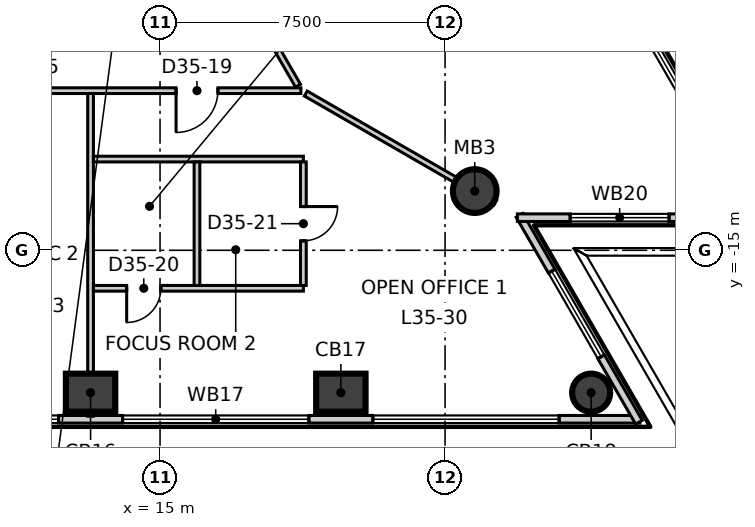
"""IFC4 building model, lengths in metres.
Left out: names, types, materials, properties, quantities, classifications, styles, units other than length and angle.
Written with IfcOpenShell. Run it as: python <this file> out.ifc"""

import sys

from ifc_helpers import new_model, si_unit, direction, frame, frame_2d, origin, origin_2d, place, context, subcontext, project, spatial, rectangle, circle, extrude, element, fill, save


model = new_model("IFC4")
c1 = context("Model", 3, precision=1e-05, world=origin(), true_north=direction((0.0, 1.0)))
c2 = subcontext(c1, "Body", "Model", "MODEL_VIEW")
j1 = project(units=[si_unit("LENGTHUNIT", "METRE"), si_unit("PLANEANGLEUNIT", "RADIAN")], contexts=[c1])
p1 = place(None, origin())
s1 = spatial("IfcSite", under=j1, at=p1, CompositionType="ELEMENT")
p2 = place(p1, origin())
s2 = spatial("IfcBuilding", under=s1, at=p2, CompositionType="ELEMENT")
p3 = place(p2, frame((0.0, 0.0, 152.3)))
s3 = spatial("IfcBuildingStorey", under=s2, at=p3, CompositionType="ELEMENT", Elevation=152.3)
for number, where, z_axis, x_axis in (
    (1, (13.172, -18.746, -0.3), (0.0, 0.0, 1.0), (1.0, 0.0, 0.0)),
    (2, (19.758, -18.746, -0.3), (0.0, 0.0, 1.0), (1.0, 0.0, 0.0)),
):
    element("IfcColumn", number, at=place(p3, frame(where, z_axis=z_axis, x_axis=x_axis)), inside=s3, PredefinedType="COLUMN", context=c2, shape_type="SweptSolid", body=[
        extrude(rectangle(XDim=1.3, YDim=1.0, at=origin_2d()), origin(), (0.0, 0.0, 1.0), 4.0),
    ])
p4 = place(p3, frame((26.344, -18.746, -0.3), z_axis=(0.0, 0.0, 1.0), x_axis=(1.0, 0.0, 0.0)))
e3 = element("IfcColumn", 3, at=p4, inside=s3, PredefinedType="COLUMN", context=c2, shape_type="SweptSolid", body=[
    extrude(circle(Radius=0.5, at=origin_2d()), origin(), (0.0, 0.0, 1.0), 4.0),
])
p5 = place(p3, frame((23.281, -13.442, -0.3), z_axis=(0.0, 0.0, 1.0), x_axis=(1.0, 0.0, 0.0)))
e4 = element("IfcColumn", 4, at=p5, inside=s3, PredefinedType="COLUMN", context=c2, shape_type="SweptSolid", body=[
    extrude(circle(Radius=0.575, at=origin_2d()), origin(), (0.0, 0.0, 1.0), 4.0),
])
p6 = place(p3, frame((-27.647, -19.446, 0.0), z_axis=(0.0, 0.0, 1.0), x_axis=(1.0, 0.0, 0.0)))
e5 = element("IfcWall", 5, at=p6, inside=s3, PredefinedType="ELEMENTEDWALL", context=c2, shape_type="SweptSolid", body=[
    extrude(rectangle(XDim=55.274, YDim=0.2, at=frame_2d((27.637, 0.0))), origin(), (0.0, 0.0, 1.0), 3.7),
])
p7 = place(p6, frame((2.146, 0.0, 0.9)))
e6 = element("IfcOpeningElement", 6, at=p7, cuts=e5, PredefinedType="OPENING", context=c2, shape_type="SweptSolid", body=[
    extrude(rectangle(XDim=4.9, YDim=2.5, at=frame_2d((2.45, 1.25))), frame((0.0, 0.11, 0.0), z_axis=(0.0, -1.0, 0.0), x_axis=(1.0, 0.0, 0.0)), (0.0, 0.0, 1.0), 0.22),
])
p8 = place(p6, frame((8.732, 0.0, 0.9)))
e7 = element("IfcOpeningElement", 7, at=p8, cuts=e5, PredefinedType="OPENING", context=c2, shape_type="SweptSolid", body=[
    extrude(rectangle(XDim=4.9, YDim=2.5, at=frame_2d((2.45, 1.25))), frame((0.0, 0.11, 0.0), z_axis=(0.0, -1.0, 0.0), x_axis=(1.0, 0.0, 0.0)), (0.0, 0.0, 1.0), 0.22),
])
p9 = place(p6, frame((15.318, 0.0, 0.9)))
e8 = element("IfcOpeningElement", 8, at=p9, cuts=e5, PredefinedType="OPENING", context=c2, shape_type="SweptSolid", body=[
    extrude(rectangle(XDim=4.9, YDim=2.5, at=frame_2d((2.45, 1.25))), frame((0.0, 0.11, 0.0), z_axis=(0.0, -1.0, 0.0), x_axis=(1.0, 0.0, 0.0)), (0.0, 0.0, 1.0), 0.22),
])
p10 = place(p6, frame((21.904, 0.0, 0.9)))
e9 = element("IfcOpeningElement", 9, at=p10, cuts=e5, PredefinedType="OPENING", context=c2, shape_type="SweptSolid", body=[
    extrude(rectangle(XDim=4.9, YDim=2.5, at=frame_2d((2.45, 1.25))), frame((0.0, 0.11, 0.0), z_axis=(0.0, -1.0, 0.0), x_axis=(1.0, 0.0, 0.0)), (0.0, 0.0, 1.0), 0.22),
])
p11 = place(p6, frame((28.49, 0.0, 0.9)))
e10 = element("IfcOpeningElement", 10, at=p11, cuts=e5, PredefinedType="OPENING", context=c2, shape_type="SweptSolid", body=[
    extrude(rectangle(XDim=4.9, YDim=2.5, at=frame_2d((2.45, 1.25))), frame((0.0, 0.11, 0.0), z_axis=(0.0, -1.0, 0.0), x_axis=(1.0, 0.0, 0.0)), (0.0, 0.0, 1.0), 0.22),
])
p12 = place(p6, frame((35.076, 0.0, 0.9)))
e11 = element("IfcOpeningElement", 11, at=p12, cuts=e5, PredefinedType="OPENING", context=c2, shape_type="SweptSolid", body=[
    extrude(rectangle(XDim=4.9, YDim=2.5, at=frame_2d((2.45, 1.25))), frame((0.0, 0.11, 0.0), z_axis=(0.0, -1.0, 0.0), x_axis=(1.0, 0.0, 0.0)), (0.0, 0.0, 1.0), 0.22),
])
p13 = place(p6, frame((41.662, 0.0, 0.9)))
e12 = element("IfcOpeningElement", 12, at=p13, cuts=e5, PredefinedType="OPENING", context=c2, shape_type="SweptSolid", body=[
    extrude(rectangle(XDim=4.9, YDim=2.5, at=frame_2d((2.45, 1.25))), frame((0.0, 0.11, 0.0), z_axis=(0.0, -1.0, 0.0), x_axis=(1.0, 0.0, 0.0)), (0.0, 0.0, 1.0), 0.22),
])
p14 = place(p6, frame((48.248, 0.0, 0.9)))
e13 = element("IfcOpeningElement", 13, at=p14, cuts=e5, PredefinedType="OPENING", context=c2, shape_type="SweptSolid", body=[
    extrude(rectangle(XDim=4.9, YDim=2.5, at=frame_2d((2.45, 1.25))), frame((0.0, 0.11, 0.0), z_axis=(0.0, -1.0, 0.0), x_axis=(1.0, 0.0, 0.0)), (0.0, 0.0, 1.0), 0.22),
])
p15 = place(p3, frame((27.602, -19.524, 0.0), z_axis=(0.0, 0.0, 1.0), x_axis=(-0.500074377092, 0.865982457891, 0.0)))
e14 = element("IfcWall", 14, at=p15, inside=s3, PredefinedType="ELEMENTEDWALL", context=c2, shape_type="SweptSolid", body=[
    extrude(rectangle(XDim=6.285, YDim=0.2, at=frame_2d((3.143, 0.0))), origin(), (0.0, 0.0, 1.0), 3.7),
])
p16 = place(p15, frame((1.99, 0.0, 0.9)))
e15 = element("IfcOpeningElement", 15, at=p16, cuts=e14, PredefinedType="OPENING", context=c2, shape_type="SweptSolid", body=[
    extrude(rectangle(XDim=2.6, YDim=2.5, at=frame_2d((1.3, 1.25))), frame((0.0, 0.11, 0.0), z_axis=(0.0, -1.0, 0.0), x_axis=(1.0, 0.0, 0.0)), (0.0, 0.0, 1.0), 0.22),
])
p17 = place(p3, frame((24.404, -14.142, 0.0), z_axis=(0.0, 0.0, 1.0), x_axis=(1.0, 0.0, 0.0)))
e16 = element("IfcWall", 16, at=p17, inside=s3, PredefinedType="ELEMENTEDWALL", context=c2, shape_type="SweptSolid", body=[
    extrude(rectangle(XDim=6.285, YDim=0.2, at=frame_2d((3.143, 0.0))), origin(), (0.0, 0.0, 1.0), 3.7),
])
p18 = place(p17, frame((1.39, 0.0, 0.9)))
e17 = element("IfcOpeningElement", 17, at=p18, cuts=e16, PredefinedType="OPENING", context=c2, shape_type="SweptSolid", body=[
    extrude(rectangle(XDim=2.6, YDim=2.5, at=frame_2d((1.3, 1.25))), frame((0.0, 0.11, 0.0), z_axis=(0.0, -1.0, 0.0), x_axis=(1.0, 0.0, 0.0)), (0.0, 0.0, 1.0), 0.22),
])
p19 = place(p3, frame((30.664, -14.22, 0.0), z_axis=(0.0, 0.0, 1.0), x_axis=(-0.499984613623, 0.866034286931, 0.0)))
e18 = element("IfcWall", 18, at=p19, inside=s3, PredefinedType="ELEMENTEDWALL", context=c2, shape_type="SweptSolid", body=[
    extrude(rectangle(XDim=55.274, YDim=0.2, at=frame_2d((27.637, 0.0))), origin(), (0.0, 0.0, 1.0), 3.7),
])
p20 = place(p19, frame((2.146, 0.0, 0.9)))
e19 = element("IfcOpeningElement", 19, at=p20, cuts=e18, PredefinedType="OPENING", context=c2, shape_type="SweptSolid", body=[
    extrude(rectangle(XDim=4.9, YDim=2.5, at=frame_2d((2.45, 1.25))), frame((0.0, 0.11, 0.0), z_axis=(0.0, -1.0, 0.0), x_axis=(1.0, 0.0, 0.0)), (0.0, 0.0, 1.0), 0.22),
])
p21 = place(p19, frame((8.732, 0.0, 0.9)))
e20 = element("IfcOpeningElement", 20, at=p21, cuts=e18, PredefinedType="OPENING", context=c2, shape_type="SweptSolid", body=[
    extrude(rectangle(XDim=4.9, YDim=2.5, at=frame_2d((2.45, 1.25))), frame((0.0, 0.11, 0.0), z_axis=(0.0, -1.0, 0.0), x_axis=(1.0, 0.0, 0.0)), (0.0, 0.0, 1.0), 0.22),
])
p22 = place(p19, frame((15.318, 0.0, 0.9)))
e21 = element("IfcOpeningElement", 21, at=p22, cuts=e18, PredefinedType="OPENING", context=c2, shape_type="SweptSolid", body=[
    extrude(rectangle(XDim=4.9, YDim=2.5, at=frame_2d((2.45, 1.25))), frame((0.0, 0.11, 0.0), z_axis=(0.0, -1.0, 0.0), x_axis=(1.0, 0.0, 0.0)), (0.0, 0.0, 1.0), 0.22),
])
p23 = place(p19, frame((21.904, 0.0, 0.9)))
e22 = element("IfcOpeningElement", 22, at=p23, cuts=e18, PredefinedType="OPENING", context=c2, shape_type="SweptSolid", body=[
    extrude(rectangle(XDim=4.9, YDim=2.5, at=frame_2d((2.45, 1.25))), frame((0.0, 0.11, 0.0), z_axis=(0.0, -1.0, 0.0), x_axis=(1.0, 0.0, 0.0)), (0.0, 0.0, 1.0), 0.22),
])
p24 = place(p19, frame((28.49, 0.0, 0.9)))
e23 = element("IfcOpeningElement", 23, at=p24, cuts=e18, PredefinedType="OPENING", context=c2, shape_type="SweptSolid", body=[
    extrude(rectangle(XDim=4.9, YDim=2.5, at=frame_2d((2.45, 1.25))), frame((0.0, 0.11, 0.0), z_axis=(0.0, -1.0, 0.0), x_axis=(1.0, 0.0, 0.0)), (0.0, 0.0, 1.0), 0.22),
])
p25 = place(p19, frame((35.076, 0.0, 0.9)))
e24 = element("IfcOpeningElement", 24, at=p25, cuts=e18, PredefinedType="OPENING", context=c2, shape_type="SweptSolid", body=[
    extrude(rectangle(XDim=4.9, YDim=2.5, at=frame_2d((2.45, 1.25))), frame((0.0, 0.11, 0.0), z_axis=(0.0, -1.0, 0.0), x_axis=(1.0, 0.0, 0.0)), (0.0, 0.0, 1.0), 0.22),
])
p26 = place(p19, frame((41.662, 0.0, 0.9)))
e25 = element("IfcOpeningElement", 25, at=p26, cuts=e18, PredefinedType="OPENING", context=c2, shape_type="SweptSolid", body=[
    extrude(rectangle(XDim=4.9, YDim=2.5, at=frame_2d((2.45, 1.25))), frame((0.0, 0.11, 0.0), z_axis=(0.0, -1.0, 0.0), x_axis=(1.0, 0.0, 0.0)), (0.0, 0.0, 1.0), 0.22),
])
p27 = place(p19, frame((48.248, 0.0, 0.9)))
e26 = element("IfcOpeningElement", 26, at=p27, cuts=e18, PredefinedType="OPENING", context=c2, shape_type="SweptSolid", body=[
    extrude(rectangle(XDim=4.9, YDim=2.5, at=frame_2d((2.45, 1.25))), frame((0.0, 0.11, 0.0), z_axis=(0.0, -1.0, 0.0), x_axis=(1.0, 0.0, 0.0)), (0.0, 0.0, 1.0), 0.22),
])
p28 = place(p3, frame((0.901, -10.8, 0.0), z_axis=(0.0, 0.0, 1.0), x_axis=(1.0, 0.0, 0.0)))
e27 = element("IfcWall", 27, at=p28, inside=s3, PredefinedType="PARTITIONING", context=c2, shape_type="SweptSolid", body=[
    extrude(rectangle(XDim=17.805, YDim=0.15, at=frame_2d((8.903, 0.0))), origin(), (0.0, 0.0, 1.0), 3.7),
])
p29 = place(p28, frame((9.949, 0.0, 0.0)))
e28 = element("IfcOpeningElement", 28, at=p29, cuts=e27, PredefinedType="OPENING", context=c2, shape_type="SweptSolid", body=[
    extrude(rectangle(XDim=1.1, YDim=2.1, at=frame_2d((0.55, 1.05))), frame((0.0, 0.085, 0.0), z_axis=(0.0, -1.0, 0.0), x_axis=(1.0, 0.0, 0.0)), (0.0, 0.0, 1.0), 0.17),
])
p30 = place(p28, frame((4.349, 0.0, 0.0)))
e29 = element("IfcOpeningElement", 29, at=p30, cuts=e27, PredefinedType="OPENING", context=c2, shape_type="SweptSolid", body=[
    extrude(rectangle(XDim=0.9, YDim=2.1, at=frame_2d((0.45, 1.05))), frame((0.0, 0.085, 0.0), z_axis=(0.0, -1.0, 0.0), x_axis=(1.0, 0.0, 0.0)), (0.0, 0.0, 1.0), 0.17),
])
p31 = place(p28, frame((7.049, 0.0, 0.0)))
e30 = element("IfcOpeningElement", 30, at=p31, cuts=e27, PredefinedType="OPENING", context=c2, shape_type="SweptSolid", body=[
    extrude(rectangle(XDim=1.0, YDim=2.1, at=frame_2d((0.5, 1.05))), frame((0.0, 0.085, 0.0), z_axis=(0.0, -1.0, 0.0), x_axis=(1.0, 0.0, 0.0)), (0.0, 0.0, 1.0), 0.17),
])
p32 = place(p28, frame((14.521, 0.0, 0.0)))
e31 = element("IfcOpeningElement", 31, at=p32, cuts=e27, PredefinedType="OPENING", context=c2, shape_type="SweptSolid", body=[
    extrude(rectangle(XDim=1.1, YDim=2.1, at=frame_2d((0.55, 1.05))), frame((0.0, 0.085, 0.0), z_axis=(0.0, -1.0, 0.0), x_axis=(1.0, 0.0, 0.0)), (0.0, 0.0, 1.0), 0.17),
])
p33 = place(p3, frame((18.836, -10.875, 0.0), z_axis=(0.0, 0.0, 1.0), x_axis=(0.86606191518, -0.499936755075, 0.0)))
e32 = element("IfcWall", 32, at=p33, inside=s3, PredefinedType="PARTITIONING", context=c2, shape_type="SweptSolid", body=[
    extrude(rectangle(XDim=5.753, YDim=0.15, at=frame_2d((2.876, 0.0))), origin(), (0.0, 0.0, 1.0), 3.2),
])
p34 = place(p3, frame((9.803, 4.62, 0.0), z_axis=(0.0, 0.0, 1.0), x_axis=(0.500017706633, -0.866015180614, 0.0)))
e33 = element("IfcWall", 33, at=p34, inside=s3, PredefinedType="PARTITIONING", context=c2, shape_type="SweptSolid", body=[
    extrude(rectangle(XDim=17.656, YDim=0.15, at=frame_2d((8.828, 0.0))), origin(), (0.0, 0.0, 1.0), 3.7),
])
p35 = place(p34, frame((14.456, 0.0, 0.0)))
e34 = element("IfcOpeningElement", 34, at=p35, cuts=e33, PredefinedType="OPENING", context=c2, shape_type="SweptSolid", body=[
    extrude(rectangle(XDim=1.1, YDim=2.1, at=frame_2d((0.55, 1.05))), frame((0.0, 0.085, 0.0), z_axis=(0.0, -1.0, 0.0), x_axis=(1.0, 0.0, 0.0)), (0.0, 0.0, 1.0), 0.17),
])
p36 = place(p34, frame((4.321, 0.0, 0.0)))
e35 = element("IfcOpeningElement", 35, at=p36, cuts=e33, PredefinedType="OPENING", context=c2, shape_type="SweptSolid", body=[
    extrude(rectangle(XDim=1.1, YDim=2.1, at=frame_2d((0.55, 1.05))), frame((0.0, 0.085, 0.0), z_axis=(0.0, -1.0, 0.0), x_axis=(1.0, 0.0, 0.0)), (0.0, 0.0, 1.0), 0.17),
])
p37 = place(p34, frame((10.521, 0.0, 0.0)))
e36 = element("IfcOpeningElement", 36, at=p37, cuts=e33, PredefinedType="OPENING", context=c2, shape_type="SweptSolid", body=[
    extrude(rectangle(XDim=0.9, YDim=2.1, at=frame_2d((0.45, 1.05))), frame((0.0, 0.085, 0.0), z_axis=(0.0, -1.0, 0.0), x_axis=(1.0, 0.0, 0.0)), (0.0, 0.0, 1.0), 0.17),
])
p38 = place(p34, frame((8.121, 0.0, 0.0)))
e37 = element("IfcOpeningElement", 37, at=p38, cuts=e33, PredefinedType="OPENING", context=c2, shape_type="SweptSolid", body=[
    extrude(rectangle(XDim=0.9, YDim=2.1, at=frame_2d((0.45, 1.05))), frame((0.0, 0.085, 0.0), z_axis=(0.0, -1.0, 0.0), x_axis=(1.0, 0.0, 0.0)), (0.0, 0.0, 1.0), 0.17),
])
p39 = place(p3, frame((13.172, -19.366, 0.0), z_axis=(0.0, 0.0, 1.0), x_axis=(0.0, 1.0, 0.0)))
e38 = element("IfcWall", 38, at=p39, inside=s3, PredefinedType="PARTITIONING", context=c2, shape_type="SweptSolid", body=[
    extrude(rectangle(XDim=8.491, YDim=0.15, at=frame_2d((4.246, 0.0))), origin(), (0.0, 0.0, 1.0), 3.7),
])
p40 = place(p3, frame((13.247, -16.0, 0.0), z_axis=(0.0, 0.0, 1.0), x_axis=(1.0, 0.0, 0.0)))
e39 = element("IfcWall", 39, at=p40, inside=s3, PredefinedType="PARTITIONING", context=c2, shape_type="SweptSolid", body=[
    extrude(rectangle(XDim=5.525, YDim=0.15, at=frame_2d((2.762, 0.0))), origin(), (0.0, 0.0, 1.0), 3.7),
])
p41 = place(p40, frame((0.875, 0.0, 0.0)))
e40 = element("IfcOpeningElement", 40, at=p41, cuts=e39, PredefinedType="OPENING", context=c2, shape_type="SweptSolid", body=[
    extrude(rectangle(XDim=0.9, YDim=2.1, at=frame_2d((0.45, 1.05))), frame((0.0, 0.085, 0.0), z_axis=(0.0, -1.0, 0.0), x_axis=(1.0, 0.0, 0.0)), (0.0, 0.0, 1.0), 0.17),
])
p42 = place(p3, frame((13.247, -12.6, 0.0), z_axis=(0.0, 0.0, 1.0), x_axis=(1.0, 0.0, 0.0)))
e41 = element("IfcWall", 41, at=p42, inside=s3, PredefinedType="PARTITIONING", context=c2, shape_type="SweptSolid", body=[
    extrude(rectangle(XDim=5.525, YDim=0.15, at=frame_2d((2.762, 0.0))), origin(), (0.0, 0.0, 1.0), 3.7),
])
p43 = place(p3, frame((18.772, -15.925, 0.0), z_axis=(0.0, 0.0, 1.0), x_axis=(0.0, 1.0, 0.0)))
e42 = element("IfcWall", 42, at=p43, inside=s3, PredefinedType="PARTITIONING", context=c2, shape_type="SweptSolid", body=[
    extrude(rectangle(XDim=3.25, YDim=0.15, at=frame_2d((1.625, 0.0))), origin(), (0.0, 0.0, 1.0), 3.7),
])
p44 = place(p43, frame((1.175, 0.0, 0.0)))
e43 = element("IfcOpeningElement", 43, at=p44, cuts=e42, PredefinedType="OPENING", context=c2, shape_type="SweptSolid", body=[
    extrude(rectangle(XDim=0.9, YDim=2.1, at=frame_2d((0.45, 1.05))), frame((0.0, 0.085, 0.0), z_axis=(0.0, -1.0, 0.0), x_axis=(1.0, 0.0, 0.0)), (0.0, 0.0, 1.0), 0.17),
])
p45 = place(p3, frame((15.972, -15.925, 0.0), z_axis=(0.0, 0.0, 1.0), x_axis=(0.0, 1.0, 0.0)))
e44 = element("IfcWall", 44, at=p45, inside=s3, PredefinedType="PARTITIONING", context=c2, shape_type="SweptSolid", body=[
    extrude(rectangle(XDim=3.25, YDim=0.15, at=frame_2d((1.625, 0.0))), origin(), (0.0, 0.0, 1.0), 3.7),
])
p46 = place(p12, origin())
e45 = element("IfcWindow", 45, at=p46, inside=s3, PartitioningType="SINGLE_PANEL", PredefinedType="WINDOW", context=c2, shape_type="SweptSolid", body=[
    extrude(rectangle(XDim=4.9, YDim=2.5, at=frame_2d((2.45, 1.25))), frame((0.0, 0.03, 0.0), z_axis=(0.0, -1.0, 0.0), x_axis=(1.0, 0.0, 0.0)), (0.0, 0.0, 1.0), 0.06),
])
fill(e11, e45)
p47 = place(p13, origin())
e46 = element("IfcWindow", 46, at=p47, inside=s3, PartitioningType="SINGLE_PANEL", PredefinedType="WINDOW", context=c2, shape_type="SweptSolid", body=[
    extrude(rectangle(XDim=4.9, YDim=2.5, at=frame_2d((2.45, 1.25))), frame((0.0, 0.03, 0.0), z_axis=(0.0, -1.0, 0.0), x_axis=(1.0, 0.0, 0.0)), (0.0, 0.0, 1.0), 0.06),
])
fill(e12, e46)
p48 = place(p14, origin())
e47 = element("IfcWindow", 47, at=p48, inside=s3, PartitioningType="SINGLE_PANEL", PredefinedType="WINDOW", context=c2, shape_type="SweptSolid", body=[
    extrude(rectangle(XDim=4.9, YDim=2.5, at=frame_2d((2.45, 1.25))), frame((0.0, 0.03, 0.0), z_axis=(0.0, -1.0, 0.0), x_axis=(1.0, 0.0, 0.0)), (0.0, 0.0, 1.0), 0.06),
])
fill(e13, e47)
p49 = place(p16, origin())
e48 = element("IfcWindow", 48, at=p49, inside=s3, PartitioningType="SINGLE_PANEL", PredefinedType="WINDOW", context=c2, shape_type="SweptSolid", body=[
    extrude(rectangle(XDim=2.6, YDim=2.5, at=frame_2d((1.3, 1.25))), frame((0.0, 0.03, 0.0), z_axis=(0.0, -1.0, 0.0), x_axis=(1.0, 0.0, 0.0)), (0.0, 0.0, 1.0), 0.06),
])
fill(e15, e48)
p50 = place(p18, origin())
e49 = element("IfcWindow", 49, at=p50, inside=s3, PartitioningType="SINGLE_PANEL", PredefinedType="WINDOW", context=c2, shape_type="SweptSolid", body=[
    extrude(rectangle(XDim=2.6, YDim=2.5, at=frame_2d((1.3, 1.25))), frame((0.0, 0.03, 0.0), z_axis=(0.0, -1.0, 0.0), x_axis=(1.0, 0.0, 0.0)), (0.0, 0.0, 1.0), 0.06),
])
fill(e17, e49)
p51 = place(p20, origin())
e50 = element("IfcWindow", 50, at=p51, inside=s3, PartitioningType="SINGLE_PANEL", PredefinedType="WINDOW", context=c2, shape_type="SweptSolid", body=[
    extrude(rectangle(XDim=4.9, YDim=2.5, at=frame_2d((2.45, 1.25))), frame((0.0, 0.03, 0.0), z_axis=(0.0, -1.0, 0.0), x_axis=(1.0, 0.0, 0.0)), (0.0, 0.0, 1.0), 0.06),
])
fill(e19, e50)
p52 = place(p32, origin())
e51 = element("IfcDoor", 51, at=p52, inside=s3, OperationType="SINGLE_SWING_LEFT", PredefinedType="DOOR", context=c2, shape_type="SweptSolid", body=[
    extrude(rectangle(XDim=1.1, YDim=2.1, at=frame_2d((0.55, 1.05))), frame((0.0, 0.025, 0.0), z_axis=(0.0, -1.0, 0.0), x_axis=(1.0, 0.0, 0.0)), (0.0, 0.0, 1.0), 0.05),
])
fill(e31, e51)
p53 = place(p41, origin())
e52 = element("IfcDoor", 52, at=p53, inside=s3, OperationType="SINGLE_SWING_LEFT", PredefinedType="DOOR", context=c2, shape_type="SweptSolid", body=[
    extrude(rectangle(XDim=0.9, YDim=2.1, at=frame_2d((0.45, 1.05))), frame((0.0, 0.025, 0.0), z_axis=(0.0, -1.0, 0.0), x_axis=(1.0, 0.0, 0.0)), (0.0, 0.0, 1.0), 0.05),
])
fill(e40, e52)
p54 = place(p44, origin())
e53 = element("IfcDoor", 53, at=p54, inside=s3, OperationType="SINGLE_SWING_RIGHT", PredefinedType="DOOR", context=c2, shape_type="SweptSolid", body=[
    extrude(rectangle(XDim=0.9, YDim=2.1, at=frame_2d((0.45, 1.05))), frame((0.0, 0.025, 0.0), z_axis=(0.0, -1.0, 0.0), x_axis=(1.0, 0.0, 0.0)), (0.0, 0.0, 1.0), 0.05),
])
fill(e43, e53)
save(model, sys.argv[1])
